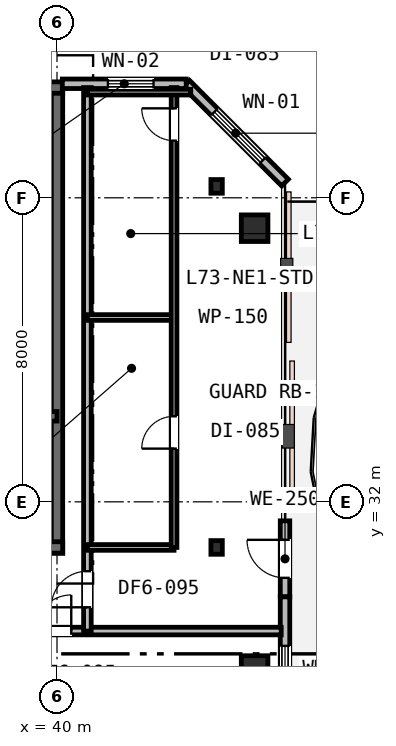
"""IFC4 building model, lengths in metres.
Left out: names, types, materials, properties, quantities, classifications, styles, units other than length and angle.
Written with IfcOpenShell. Run it as: python <this file> out.ifc"""

import sys

from ifc_helpers import new_model, si_unit, direction, frame, frame_2d, origin, origin_2d, place, context, subcontext, project, spatial, rectangle, i_section, extrude, element, fill, save


model = new_model("IFC4")
c1 = context("Model", 3, precision=1e-05, world=origin(), true_north=direction((0.0, 1.0)))
c2 = subcontext(c1, "Body", "Model", "MODEL_VIEW")
j1 = project(units=[si_unit("LENGTHUNIT", "METRE"), si_unit("PLANEANGLEUNIT", "RADIAN")], contexts=[c1])
p1 = place(None, origin())
s1 = spatial("IfcSite", under=j1, at=p1, CompositionType="ELEMENT")
p2 = place(p1, origin())
s2 = spatial("IfcBuilding", under=s1, at=p2, CompositionType="ELEMENT")
p3 = place(p2, frame((0.0, 0.0, 283.0)))
s3 = spatial("IfcBuildingStorey", under=s2, at=p3, CompositionType="ELEMENT", Elevation=283.0)
p4 = place(p3, frame((40.0, 30.65, 0.0), z_axis=(0.0, 0.0, 1.0), x_axis=(0.0, 1.0, 0.0)))
e1 = element("IfcWall", 1, at=p4, inside=s3, PredefinedType="SHEAR", context=c2, shape_type="SweptSolid", body=[
    extrude(rectangle(XDim=12.3, YDim=0.3, at=frame_2d((6.15, 0.0))), origin(), (0.0, 0.0, 1.0), 3.8),
])
p5 = place(p3, frame((15.85, 42.9, 0.0), z_axis=(0.0, 0.0, 1.0), x_axis=(1.0, 0.0, 0.0)))
e2 = element("IfcWall", 2, at=p5, inside=s3, PredefinedType="SHEAR", context=c2, shape_type="SweptSolid", body=[
    extrude(rectangle(XDim=24.3, YDim=0.3, at=frame_2d((12.15, 0.0))), origin(), (0.0, 0.0, 1.0), 3.8),
])
p6 = place(p5, frame((1.6, 0.0, 0.95)))
e3 = element("IfcOpeningElement", 3, at=p6, cuts=e2, PredefinedType="OPENING", context=c2, shape_type="SweptSolid", body=[
    extrude(rectangle(XDim=1.2, YDim=1.6, at=frame_2d((0.6, 0.8))), frame((0.0, 0.16, 0.0), z_axis=(0.0, -1.0, 0.0), x_axis=(1.0, 0.0, 0.0)), (0.0, 0.0, 1.0), 0.32),
])
p7 = place(p5, frame((16.5, 0.0, 0.95)))
e4 = element("IfcOpeningElement", 4, at=p7, cuts=e2, PredefinedType="OPENING", context=c2, shape_type="SweptSolid", body=[
    extrude(rectangle(XDim=1.2, YDim=1.6, at=frame_2d((0.6, 0.8))), frame((0.0, 0.16, 0.0), z_axis=(0.0, -1.0, 0.0), x_axis=(1.0, 0.0, 0.0)), (0.0, 0.0, 1.0), 0.32),
])
p8 = place(p5, frame((21.6, 0.0, 0.95)))
e5 = element("IfcOpeningElement", 5, at=p8, cuts=e2, PredefinedType="OPENING", context=c2, shape_type="SweptSolid", body=[
    extrude(rectangle(XDim=1.2, YDim=1.6, at=frame_2d((0.6, 0.8))), frame((0.0, 0.16, 0.0), z_axis=(0.0, -1.0, 0.0), x_axis=(1.0, 0.0, 0.0)), (0.0, 0.0, 1.0), 0.32),
])
p9 = place(p3, frame((28.95, 30.8, 0.0), z_axis=(0.0, 0.0, 1.0), x_axis=(1.0, 0.0, 0.0)))
e6 = element("IfcWall", 6, at=p9, inside=s3, PredefinedType="SHEAR", context=c2, shape_type="SweptSolid", body=[
    extrude(rectangle(XDim=11.2, YDim=0.3, at=frame_2d((5.6, 0.0))), origin(), (0.0, 0.0, 1.0), 3.8),
])
p10 = place(p9, frame((7.65, 0.0, 0.0)))
e7 = element("IfcOpeningElement", 7, at=p10, cuts=e6, PredefinedType="OPENING", context=c2, shape_type="SweptSolid", body=[
    extrude(rectangle(XDim=1.1, YDim=2.15, at=frame_2d((0.55, 1.075))), frame((0.0, 0.16, 0.0), z_axis=(0.0, -1.0, 0.0), x_axis=(1.0, 0.0, 0.0)), (0.0, 0.0, 1.0), 0.32),
])
p11 = place(p3, frame((33.95, 34.25, 0.0), z_axis=(0.0, 0.0, 1.0), x_axis=(1.0, 0.0, 0.0)))
e8 = element("IfcWall", 8, at=p11, inside=s3, PredefinedType="SHEAR", context=c2, shape_type="SweptSolid", body=[
    extrude(rectangle(XDim=6.05, YDim=0.25, at=frame_2d((3.025, 0.0))), origin(), (0.0, 0.0, 1.0), 3.8),
])
p12 = place(p11, frame((3.7, 0.0, 0.0)))
e9 = element("IfcOpeningElement", 9, at=p12, cuts=e8, PredefinedType="OPENING", context=c2, shape_type="SweptSolid", body=[
    extrude(rectangle(XDim=1.0, YDim=2.15, at=frame_2d((0.5, 1.075))), frame((0.0, 0.135, 0.0), z_axis=(0.0, -1.0, 0.0), x_axis=(1.0, 0.0, 0.0)), (0.0, 0.0, 1.0), 0.27),
])
p13 = place(p11, frame((0.55, 0.0, 0.0)))
e10 = element("IfcOpeningElement", 10, at=p13, cuts=e8, PredefinedType="OPENING", context=c2, shape_type="SweptSolid", body=[
    extrude(rectangle(XDim=1.1, YDim=2.15, at=frame_2d((0.55, 1.075))), frame((0.0, 0.135, 0.0), z_axis=(0.0, -1.0, 0.0), x_axis=(1.0, 0.0, 0.0)), (0.0, 0.0, 1.0), 0.27),
])
for number, where, z_axis, x_axis in (
    (11, (45.2, 27.6, 0.0), (0.0, 0.0, 1.0), (1.0, 0.0, 0.0)),
    (12, (45.2, 39.2, 0.0), (0.0, 0.0, 1.0), (1.0, 0.0, 0.0)),
):
    element("IfcColumn", number, at=place(p3, frame(where, z_axis=z_axis, x_axis=x_axis)), inside=s3, PredefinedType="COLUMN", context=c2, shape_type="SweptSolid", body=[
        extrude(rectangle(XDim=0.7, YDim=0.7, at=origin_2d()), origin(), (0.0, 0.0, 1.0), 3.8),
    ])
for number, where, z_axis, x_axis in (
    (13, (44.2, 30.8, 0.0), (0.0, 0.0, 1.0), (1.0, 0.0, 0.0)),
    (14, (44.2, 40.3, 0.0), (0.0, 0.0, 1.0), (1.0, 0.0, 0.0)),
):
    element("IfcColumn", number, at=place(p3, frame(where, z_axis=z_axis, x_axis=x_axis)), inside=s3, PredefinedType="COLUMN", context=c2, shape_type="SweptSolid", body=[
        extrude(i_section(OverallWidth=0.3, OverallDepth=0.36, WebThickness=0.013, FlangeThickness=0.022, FilletRadius=0.027, at=origin_2d()), origin(), (0.0, 0.0, 1.0), 3.8),
    ])
p14 = place(p3, frame((46.0, 29.5, 0.0), z_axis=(0.0, 0.0, 1.0), x_axis=(0.0, 1.0, 0.0)))
e15 = element("IfcWall", 15, at=p14, inside=s3, PredefinedType="STANDARD", context=c2, shape_type="SweptSolid", body=[
    extrude(rectangle(XDim=2.0, YDim=0.25, at=frame_2d((1.0, 0.0))), origin(), (0.0, 0.0, 1.0), 3.53),
])
p15 = place(p14, frame((0.5, 0.0, 0.0)))
e16 = element("IfcOpeningElement", 16, at=p15, cuts=e15, PredefinedType="OPENING", context=c2, shape_type="SweptSolid", body=[
    extrude(rectangle(XDim=1.0, YDim=2.15, at=frame_2d((0.5, 1.075))), frame((0.0, 0.135, 0.0), z_axis=(0.0, -1.0, 0.0), x_axis=(1.0, 0.0, 0.0)), (0.0, 0.0, 1.0), 0.27),
])
p16 = place(p3, frame((46.0, 26.6, 0.0), z_axis=(0.0, 0.0, 1.0), x_axis=(0.0, 1.0, 0.0)))
e17 = element("IfcWall", 17, at=p16, inside=s3, PredefinedType="STANDARD", context=c2, shape_type="SweptSolid", body=[
    extrude(rectangle(XDim=2.9, YDim=0.25, at=frame_2d((1.45, 0.0))), origin(), (0.0, 0.0, 1.0), 3.53),
])
p17 = place(p16, frame((0.41, 0.0, 0.85)))
e18 = element("IfcOpeningElement", 18, at=p17, cuts=e17, PredefinedType="OPENING", context=c2, shape_type="SweptSolid", body=[
    extrude(rectangle(XDim=1.2, YDim=1.6, at=frame_2d((0.6, 0.8))), frame((0.0, 0.135, 0.0), z_axis=(0.0, -1.0, 0.0), x_axis=(1.0, 0.0, 0.0)), (0.0, 0.0, 1.0), 0.27),
])
p18 = place(p3, frame((46.0, 40.4, 0.0), z_axis=(0.0, 0.0, 1.0), x_axis=(-0.707106781187, 0.707106781187, 0.0)))
e19 = element("IfcWall", 19, at=p18, inside=s3, PredefinedType="STANDARD", context=c2, shape_type="SweptSolid", body=[
    extrude(rectangle(XDim=3.677, YDim=0.25, at=frame_2d((1.839, 0.0))), origin(), (0.0, 0.0, 1.0), 3.53),
])
p19 = place(p18, frame((0.828, 0.0, 0.75)))
e20 = element("IfcOpeningElement", 20, at=p19, cuts=e19, PredefinedType="OPENING", context=c2, shape_type="SweptSolid", body=[
    extrude(rectangle(XDim=1.8, YDim=1.85, at=frame_2d((0.9, 0.925))), frame((0.0, 0.135, 0.0), z_axis=(0.0, -1.0, 0.0), x_axis=(1.0, 0.0, 0.0)), (0.0, 0.0, 1.0), 0.27),
])
p20 = place(p3, frame((43.4, 43.0, 0.0), z_axis=(0.0, 0.0, 1.0), x_axis=(-1.0, 0.0, 0.0)))
e21 = element("IfcWall", 21, at=p20, inside=s3, PredefinedType="STANDARD", context=c2, shape_type="SweptSolid", body=[
    extrude(rectangle(XDim=3.26, YDim=0.25, at=frame_2d((1.63, 0.0))), origin(), (0.0, 0.0, 1.0), 3.53),
])
p21 = place(p20, frame((0.86, 0.0, 0.85)))
e22 = element("IfcOpeningElement", 22, at=p21, cuts=e21, PredefinedType="OPENING", context=c2, shape_type="SweptSolid", body=[
    extrude(rectangle(XDim=1.2, YDim=1.6, at=frame_2d((0.6, 0.8))), frame((0.0, 0.135, 0.0), z_axis=(0.0, -1.0, 0.0), x_axis=(1.0, 0.0, 0.0)), (0.0, 0.0, 1.0), 0.27),
])
p22 = place(p3, frame((21.8, 28.6, 0.0), z_axis=(0.0, 0.0, 1.0), x_axis=(1.0, 0.0, 0.0)))
e23 = element("IfcWall", 23, at=p22, inside=s3, PredefinedType="PARTITIONING", context=c2, shape_type="SweptSolid", body=[
    extrude(rectangle(XDim=24.1, YDim=0.2, at=frame_2d((12.05, 0.0))), origin(), (0.0, 0.0, 1.0), 3.24),
])
p23 = place(p22, frame((5.525, 0.0, 0.0)))
e24 = element("IfcOpeningElement", 24, at=p23, cuts=e23, PredefinedType="OPENING", context=c2, shape_type="SweptSolid", body=[
    extrude(rectangle(XDim=0.95, YDim=2.15, at=frame_2d((0.475, 1.075))), frame((0.0, 0.11, 0.0), z_axis=(0.0, -1.0, 0.0), x_axis=(1.0, 0.0, 0.0)), (0.0, 0.0, 1.0), 0.22),
])
p24 = place(p22, frame((13.025, 0.0, 0.0)))
e25 = element("IfcOpeningElement", 25, at=p24, cuts=e23, PredefinedType="OPENING", context=c2, shape_type="SweptSolid", body=[
    extrude(rectangle(XDim=0.95, YDim=2.15, at=frame_2d((0.475, 1.075))), frame((0.0, 0.11, 0.0), z_axis=(0.0, -1.0, 0.0), x_axis=(1.0, 0.0, 0.0)), (0.0, 0.0, 1.0), 0.22),
])
p25 = place(p22, frame((17.625, 0.0, 0.0)))
e26 = element("IfcOpeningElement", 26, at=p25, cuts=e23, PredefinedType="OPENING", context=c2, shape_type="SweptSolid", body=[
    extrude(rectangle(XDim=0.95, YDim=2.15, at=frame_2d((0.475, 1.075))), frame((0.0, 0.11, 0.0), z_axis=(0.0, -1.0, 0.0), x_axis=(1.0, 0.0, 0.0)), (0.0, 0.0, 1.0), 0.22),
])
p26 = place(p3, frame((40.8, 28.6, 0.0), z_axis=(0.0, 0.0, 1.0), x_axis=(0.0, 1.0, 0.0)))
e27 = element("IfcWall", 27, at=p26, inside=s3, PredefinedType="PARTITIONING", context=c2, shape_type="SweptSolid", body=[
    extrude(rectangle(XDim=14.3, YDim=0.2, at=frame_2d((7.15, 0.0))), origin(), (0.0, 0.0, 1.0), 3.24),
])
p27 = place(p26, frame((0.625, 0.0, 0.0)))
e28 = element("IfcOpeningElement", 28, at=p27, cuts=e27, PredefinedType="OPENING", context=c2, shape_type="SweptSolid", body=[
    extrude(rectangle(XDim=0.95, YDim=2.15, at=frame_2d((0.475, 1.075))), frame((0.0, 0.11, 0.0), z_axis=(0.0, -1.0, 0.0), x_axis=(1.0, 0.0, 0.0)), (0.0, 0.0, 1.0), 0.22),
])
p28 = place(p3, frame((40.8, 30.8, 0.0), z_axis=(0.0, 0.0, 1.0), x_axis=(1.0, 0.0, 0.0)))
e29 = element("IfcWall", 29, at=p28, inside=s3, PredefinedType="PARTITIONING", context=c2, shape_type="SweptSolid", body=[
    extrude(rectangle(XDim=2.28, YDim=0.15, at=frame_2d((1.14, 0.0))), origin(), (0.0, 0.0, 1.0), 3.24),
])
p29 = place(p3, frame((40.8, 36.85, 0.0), z_axis=(0.0, 0.0, 1.0), x_axis=(1.0, 0.0, 0.0)))
e30 = element("IfcWall", 30, at=p29, inside=s3, PredefinedType="PARTITIONING", context=c2, shape_type="SweptSolid", body=[
    extrude(rectangle(XDim=2.28, YDim=0.15, at=frame_2d((1.14, 0.0))), origin(), (0.0, 0.0, 1.0), 3.53),
])
p30 = place(p3, frame((43.08, 30.8, 0.0), z_axis=(0.0, 0.0, 1.0), x_axis=(0.0, 1.0, 0.0)))
e31 = element("IfcWall", 31, at=p30, inside=s3, PredefinedType="PARTITIONING", context=c2, shape_type="SweptSolid", body=[
    extrude(rectangle(XDim=12.1, YDim=0.15, at=frame_2d((6.05, 0.0))), origin(), (0.0, 0.0, 1.0), 3.24),
])
p31 = place(p30, frame((2.6, 0.0, 0.0)))
e32 = element("IfcOpeningElement", 32, at=p31, cuts=e31, PredefinedType="OPENING", context=c2, shape_type="SweptSolid", body=[
    extrude(rectangle(XDim=0.85, YDim=2.15, at=frame_2d((0.425, 1.075))), frame((0.0, 0.085, 0.0), z_axis=(0.0, -1.0, 0.0), x_axis=(1.0, 0.0, 0.0)), (0.0, 0.0, 1.0), 0.17),
])
p32 = place(p30, frame((10.704, 0.0, 0.0)))
e33 = element("IfcOpeningElement", 33, at=p32, cuts=e31, PredefinedType="OPENING", context=c2, shape_type="SweptSolid", body=[
    extrude(rectangle(XDim=0.85, YDim=2.15, at=frame_2d((0.425, 1.075))), frame((0.0, 0.085, 0.0), z_axis=(0.0, -1.0, 0.0), x_axis=(1.0, 0.0, 0.0)), (0.0, 0.0, 1.0), 0.17),
])
p33 = place(p3, frame((40.8, 42.78, 0.0), z_axis=(0.0, 0.0, 1.0), x_axis=(1.0, 0.0, 0.0)))
e34 = element("IfcWall", 34, at=p33, inside=s3, PredefinedType="PARTITIONING", context=c2, shape_type="SweptSolid", body=[
    extrude(rectangle(XDim=2.72, YDim=0.15, at=frame_2d((1.36, 0.0))), origin(), (0.0, 0.0, 1.0), 3.53),
])
p34 = place(p15, origin())
e35 = element("IfcDoor", 35, at=p34, inside=s3, OperationType="SINGLE_SWING_RIGHT", PredefinedType="DOOR", context=c2, shape_type="SweptSolid", body=[
    extrude(rectangle(XDim=1.0, YDim=2.15, at=frame_2d((0.5, 1.075))), frame((0.0, 0.025, 0.0), z_axis=(0.0, -1.0, 0.0), x_axis=(1.0, 0.0, 0.0)), (0.0, 0.0, 1.0), 0.05),
])
fill(e16, e35)
p35 = place(p17, origin())
e36 = element("IfcWindow", 36, at=p35, inside=s3, PartitioningType="SINGLE_PANEL", PredefinedType="WINDOW", context=c2, shape_type="SweptSolid", body=[
    extrude(rectangle(XDim=1.2, YDim=1.6, at=frame_2d((0.6, 0.8))), frame((0.0, 0.03, 0.0), z_axis=(0.0, -1.0, 0.0), x_axis=(1.0, 0.0, 0.0)), (0.0, 0.0, 1.0), 0.06),
])
fill(e18, e36)
p36 = place(p19, origin())
e37 = element("IfcWindow", 37, at=p36, inside=s3, PartitioningType="SINGLE_PANEL", PredefinedType="WINDOW", context=c2, shape_type="SweptSolid", body=[
    extrude(rectangle(XDim=1.8, YDim=1.85, at=frame_2d((0.9, 0.925))), frame((0.0, 0.03, 0.0), z_axis=(0.0, -1.0, 0.0), x_axis=(1.0, 0.0, 0.0)), (0.0, 0.0, 1.0), 0.06),
])
fill(e20, e37)
p37 = place(p21, origin())
e38 = element("IfcWindow", 38, at=p37, inside=s3, PartitioningType="SINGLE_PANEL", PredefinedType="WINDOW", context=c2, shape_type="SweptSolid", body=[
    extrude(rectangle(XDim=1.2, YDim=1.6, at=frame_2d((0.6, 0.8))), frame((0.0, 0.03, 0.0), z_axis=(0.0, -1.0, 0.0), x_axis=(1.0, 0.0, 0.0)), (0.0, 0.0, 1.0), 0.06),
])
fill(e22, e38)
p38 = place(p27, origin())
e39 = element("IfcDoor", 39, at=p38, inside=s3, OperationType="SINGLE_SWING_LEFT", PredefinedType="DOOR", context=c2, shape_type="SweptSolid", body=[
    extrude(rectangle(XDim=0.95, YDim=2.15, at=frame_2d((0.475, 1.075))), frame((0.0, 0.025, 0.0), z_axis=(0.0, -1.0, 0.0), x_axis=(1.0, 0.0, 0.0)), (0.0, 0.0, 1.0), 0.05),
])
fill(e28, e39)
p39 = place(p31, origin())
e40 = element("IfcDoor", 40, at=p39, inside=s3, OperationType="SINGLE_SWING_LEFT", PredefinedType="DOOR", context=c2, shape_type="SweptSolid", body=[
    extrude(rectangle(XDim=0.85, YDim=2.15, at=frame_2d((0.425, 1.075))), frame((0.0, 0.025, 0.0), z_axis=(0.0, -1.0, 0.0), x_axis=(1.0, 0.0, 0.0)), (0.0, 0.0, 1.0), 0.05),
])
fill(e32, e40)
p40 = place(p32, origin())
e41 = element("IfcDoor", 41, at=p40, inside=s3, OperationType="SINGLE_SWING_RIGHT", PredefinedType="DOOR", context=c2, shape_type="SweptSolid", body=[
    extrude(rectangle(XDim=0.85, YDim=2.15, at=frame_2d((0.425, 1.075))), frame((0.0, 0.025, 0.0), z_axis=(0.0, -1.0, 0.0), x_axis=(1.0, 0.0, 0.0)), (0.0, 0.0, 1.0), 0.05),
])
fill(e33, e41)
p41 = place(p25, origin())
e42 = element("IfcDoor", 42, at=p41, inside=s3, OperationType="SINGLE_SWING_RIGHT", PredefinedType="DOOR", context=c2, shape_type="SweptSolid", body=[
    extrude(rectangle(XDim=0.95, YDim=2.15, at=frame_2d((0.475, 1.075))), frame((0.0, 0.025, 0.0), z_axis=(0.0, -1.0, 0.0), x_axis=(1.0, 0.0, 0.0)), (0.0, 0.0, 1.0), 0.05),
])
fill(e26, e42)
save(model, sys.argv[1])
